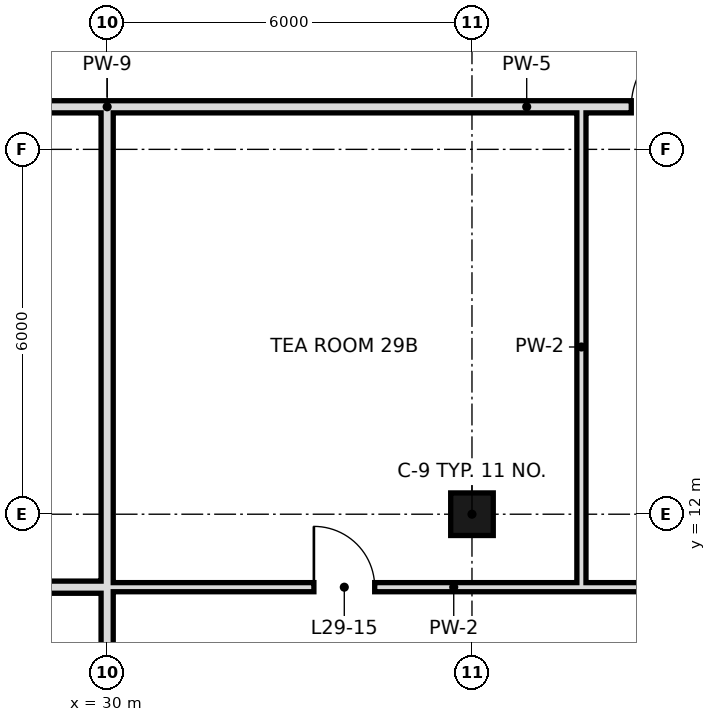
"""IFC4 building model, lengths in metres.
Left out: names, types, materials, properties, quantities, classifications, styles, units other than length and angle.
Written with IfcOpenShell. Run it as: python <this file> out.ifc"""

import sys

from ifc_helpers import new_model, si_unit, direction, frame, frame_2d, origin, origin_2d, place, context, subcontext, project, spatial, rectangle, hollow_rectangle, extrude, element, fill, save


model = new_model("IFC4")
c1 = context("Model", 3, precision=1e-05, world=origin(), true_north=direction((0.0, 1.0)))
c2 = subcontext(c1, "Body", "Model", "MODEL_VIEW")
j1 = project(units=[si_unit("LENGTHUNIT", "METRE"), si_unit("PLANEANGLEUNIT", "RADIAN")], contexts=[c1])
p1 = place(None, origin())
s1 = spatial("IfcSite", under=j1, at=p1, CompositionType="ELEMENT")
p2 = place(p1, origin())
s2 = spatial("IfcBuilding", under=s1, at=p2, CompositionType="ELEMENT")
p3 = place(p2, frame((0.0, 0.0, 130.4)))
s3 = spatial("IfcBuildingStorey", under=s2, at=p3, CompositionType="ELEMENT", Elevation=130.4)
p4 = place(p3, frame((36.0, 12.0, 0.0), z_axis=(0.0, 0.0, 1.0), x_axis=(1.0, 0.0, 0.0)))
e1 = element("IfcColumn", 1, at=p4, inside=s3, PredefinedType="COLUMN", context=c2, shape_type="SweptSolid", body=[
    extrude(hollow_rectangle(XDim=0.7, YDim=0.7, WallThickness=0.036, at=origin_2d()), origin(), (0.0, 0.0, 1.0), 3.6),
])
p5 = place(p3, frame((30.0, 10.8, 0.0), z_axis=(0.0, 0.0, 1.0), x_axis=(0.0, 1.0, 0.0)))
e2 = element("IfcWall", 2, at=p5, inside=s3, PredefinedType="SOLIDWALL", context=c2, shape_type="SweptSolid", body=[
    extrude(rectangle(XDim=7.9, YDim=0.2, at=frame_2d((3.95, 0.0))), origin(), (0.0, 0.0, 1.0), 2.72),
])
p6 = place(p3, frame((30.0, -0.6, 0.0), z_axis=(0.0, 0.0, 1.0), x_axis=(0.0, 1.0, 0.0)))
e3 = element("IfcWall", 3, at=p6, inside=s3, PredefinedType="SOLIDWALL", context=c2, shape_type="SweptSolid", body=[
    extrude(rectangle(XDim=11.4, YDim=0.2, at=frame_2d((5.7, 0.0))), origin(), (0.0, 0.0, 1.0), 2.72),
])
p7 = place(p3, frame((37.8, 10.8, 0.0), z_axis=(0.0, 0.0, 1.0), x_axis=(0.0, 1.0, 0.0)))
e4 = element("IfcWall", 4, at=p7, inside=s3, PredefinedType="PARTITIONING", context=c2, shape_type="SweptSolid", body=[
    extrude(rectangle(XDim=7.9, YDim=0.15, at=frame_2d((3.95, 0.0))), origin(), (0.0, 0.0, 1.0), 3.42),
])
p8 = place(p3, frame((25.2, 10.8, 0.0), z_axis=(0.0, 0.0, 1.0), x_axis=(1.0, 0.0, 0.0)))
e5 = element("IfcWall", 5, at=p8, inside=s3, PredefinedType="SOLIDWALL", context=c2, shape_type="SweptSolid", body=[
    extrude(rectangle(XDim=4.8, YDim=0.2, at=frame_2d((2.4, 0.0))), origin(), (0.0, 0.0, 1.0), 2.72),
])
p9 = place(p8, frame((1.9, 0.0, 0.0)))
e6 = element("IfcOpeningElement", 6, at=p9, cuts=e5, PredefinedType="OPENING", context=c2, shape_type="SweptSolid", body=[
    extrude(rectangle(XDim=1.0, YDim=2.4, at=frame_2d((0.5, 1.2))), frame((0.0, 0.11, 0.0), z_axis=(0.0, -1.0, 0.0), x_axis=(1.0, 0.0, 0.0)), (0.0, 0.0, 1.0), 0.22),
])
p10 = place(p3, frame((30.0, 10.8, 0.0), z_axis=(0.0, 0.0, 1.0), x_axis=(1.0, 0.0, 0.0)))
e7 = element("IfcWall", 7, at=p10, inside=s3, PredefinedType="PARTITIONING", context=c2, shape_type="SweptSolid", body=[
    extrude(rectangle(XDim=11.4, YDim=0.15, at=frame_2d((5.7, 0.0))), origin(), (0.0, 0.0, 1.0), 3.42),
])
p11 = place(p10, frame((9.1, 0.0, 0.0)))
e8 = element("IfcOpeningElement", 8, at=p11, cuts=e7, PredefinedType="OPENING", context=c2, shape_type="SweptSolid", body=[
    extrude(rectangle(XDim=1.0, YDim=2.4, at=frame_2d((0.5, 1.2))), frame((0.0, 0.085, 0.0), z_axis=(0.0, -1.0, 0.0), x_axis=(1.0, 0.0, 0.0)), (0.0, 0.0, 1.0), 0.17),
])
p12 = place(p10, frame((3.4, 0.0, 0.0)))
e9 = element("IfcOpeningElement", 9, at=p12, cuts=e7, PredefinedType="OPENING", context=c2, shape_type="SweptSolid", body=[
    extrude(rectangle(XDim=1.0, YDim=2.4, at=frame_2d((0.5, 1.2))), frame((0.0, 0.085, 0.0), z_axis=(0.0, -1.0, 0.0), x_axis=(1.0, 0.0, 0.0)), (0.0, 0.0, 1.0), 0.17),
])
p13 = place(p3, frame((30.0, 18.7, 0.0), z_axis=(0.0, 0.0, 1.0), x_axis=(1.0, 0.0, 0.0)))
e10 = element("IfcWall", 10, at=p13, inside=s3, PredefinedType="SOLIDWALL", context=c2, shape_type="SweptSolid", body=[
    extrude(rectangle(XDim=13.8, YDim=0.2, at=frame_2d((6.9, 0.0))), origin(), (0.0, 0.0, 1.0), 2.72),
])
p14 = place(p13, frame((8.62, 0.0, 0.0)))
e11 = element("IfcOpeningElement", 11, at=p14, cuts=e10, PredefinedType="OPENING", context=c2, shape_type="SweptSolid", body=[
    extrude(rectangle(XDim=1.2, YDim=2.4, at=frame_2d((0.6, 1.2))), frame((0.0, 0.11, 0.0), z_axis=(0.0, -1.0, 0.0), x_axis=(1.0, 0.0, 0.0)), (0.0, 0.0, 1.0), 0.22),
])
p15 = place(p3, frame((25.2, 18.7, 0.0), z_axis=(0.0, 0.0, 1.0), x_axis=(1.0, 0.0, 0.0)))
e12 = element("IfcWall", 12, at=p15, inside=s3, PredefinedType="SOLIDWALL", context=c2, shape_type="SweptSolid", body=[
    extrude(rectangle(XDim=4.8, YDim=0.2, at=frame_2d((2.4, 0.0))), origin(), (0.0, 0.0, 1.0), 2.72),
])
p16 = place(p12, origin())
e13 = element("IfcDoor", 13, at=p16, inside=s3, OperationType="SINGLE_SWING_LEFT", PredefinedType="DOOR", context=c2, shape_type="SweptSolid", body=[
    extrude(rectangle(XDim=1.0, YDim=2.4, at=frame_2d((0.5, 1.2))), frame((0.0, 0.025, 0.0), z_axis=(0.0, -1.0, 0.0), x_axis=(1.0, 0.0, 0.0)), (0.0, 0.0, 1.0), 0.05),
])
fill(e9, e13)
p17 = place(p14, frame((1.2, 0.0, 0.0), z_axis=(0.0, 0.0, 1.0), x_axis=(-1.0, 0.0, 0.0)))
e14 = element("IfcDoor", 14, at=p17, inside=s3, OperationType="SINGLE_SWING_LEFT", PredefinedType="DOOR", context=c2, shape_type="SweptSolid", body=[
    extrude(rectangle(XDim=1.2, YDim=2.4, at=frame_2d((0.6, 1.2))), frame((0.0, 0.025, 0.0), z_axis=(0.0, -1.0, 0.0), x_axis=(1.0, 0.0, 0.0)), (0.0, 0.0, 1.0), 0.05),
])
fill(e11, e14)
save(model, sys.argv[1])
